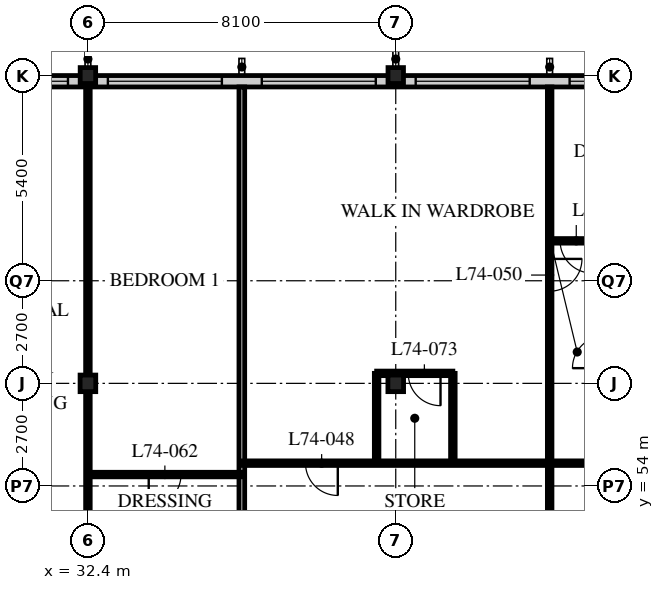
"""IFC4 building model, lengths in metres.
Left out: names, types, materials, properties, quantities, classifications, styles, units other than length and angle.
Written with IfcOpenShell. Run it as: python <this file> out.ifc"""

import sys

from ifc_helpers import new_model, si_unit, direction, frame, frame_2d, origin, origin_2d, place, context, subcontext, project, spatial, rectangle, i_section, extrude, element, fill, save


model = new_model("IFC4")
c1 = context("Model", 3, precision=1e-05, world=origin(), true_north=direction((0.0, 1.0)))
c2 = subcontext(c1, "Body", "Model", "MODEL_VIEW")
j1 = project(units=[si_unit("LENGTHUNIT", "METRE"), si_unit("PLANEANGLEUNIT", "RADIAN")], contexts=[c1])
p1 = place(None, origin())
s1 = spatial("IfcSite", under=j1, at=p1, CompositionType="ELEMENT")
p2 = place(p1, origin())
s2 = spatial("IfcBuilding", under=s1, at=p2, CompositionType="ELEMENT")
p3 = place(p2, frame((0.0, 0.0, 289.2)))
s3 = spatial("IfcBuildingStorey", under=s2, at=p3, CompositionType="ELEMENT", Elevation=289.2)
p4 = place(p3, frame((32.4, 56.7, 0.0), z_axis=(0.0, 0.0, 1.0), x_axis=(1.0, 0.0, 0.0)))
e1 = element("IfcColumn", 1, at=p4, inside=s3, PredefinedType="COLUMN", context=c2, shape_type="SweptSolid", body=[
    extrude(i_section(OverallWidth=0.412, OverallDepth=0.437, WebThickness=0.036, FlangeThickness=0.058, FilletRadius=0.015, at=origin_2d()), origin(), (0.0, 0.0, 1.0), 3.9),
])
p5 = place(p3, frame((32.4, 64.8, 0.0), z_axis=(0.0, 0.0, 1.0), x_axis=(1.0, 0.0, 0.0)))
e2 = element("IfcColumn", 2, at=p5, inside=s3, PredefinedType="COLUMN", context=c2, shape_type="SweptSolid", body=[
    extrude(i_section(OverallWidth=0.407, OverallDepth=0.419, WebThickness=0.031, FlangeThickness=0.049, FilletRadius=0.015, at=origin_2d()), origin(), (0.0, 0.0, 1.0), 3.9),
])
p6 = place(p3, frame((40.5, 56.7, 0.0), z_axis=(0.0, 0.0, 1.0), x_axis=(1.0, 0.0, 0.0)))
e3 = element("IfcColumn", 3, at=p6, inside=s3, PredefinedType="COLUMN", context=c2, shape_type="SweptSolid", body=[
    extrude(i_section(OverallWidth=0.412, OverallDepth=0.437, WebThickness=0.036, FlangeThickness=0.058, FilletRadius=0.015, at=origin_2d()), origin(), (0.0, 0.0, 1.0), 3.9),
])
p7 = place(p3, frame((40.5, 64.8, 0.0), z_axis=(0.0, 0.0, 1.0), x_axis=(1.0, 0.0, 0.0)))
e4 = element("IfcColumn", 4, at=p7, inside=s3, PredefinedType="COLUMN", context=c2, shape_type="SweptSolid", body=[
    extrude(i_section(OverallWidth=0.407, OverallDepth=0.419, WebThickness=0.031, FlangeThickness=0.049, FilletRadius=0.015, at=origin_2d()), origin(), (0.0, 0.0, 1.0), 3.9),
])
p8 = place(p3, frame((48.3, 64.65, 0.0), z_axis=(0.0, 0.0, 1.0), x_axis=(-1.0, 0.0, 0.0)))
e5 = element("IfcWall", 5, at=p8, inside=s3, PredefinedType="SOLIDWALL", context=c2, shape_type="SweptSolid", body=[
    extrude(rectangle(XDim=40.2, YDim=0.3, at=frame_2d((20.1, 0.0))), origin(), (0.0, 0.0, 1.0), 3.69),
])
p9 = place(p8, frame((0.225, 0.0, 0.6)))
e6 = element("IfcOpeningElement", 6, at=p9, cuts=e5, PredefinedType="OPENING", context=c2, shape_type="SweptSolid", body=[
    extrude(rectangle(XDim=3.0, YDim=2.4, at=frame_2d((1.5, 1.2))), frame((0.0, 0.16, 0.0), z_axis=(0.0, -1.0, 0.0), x_axis=(1.0, 0.0, 0.0)), (0.0, 0.0, 1.0), 0.32),
])
p10 = place(p8, frame((4.275, 0.0, 0.6)))
e7 = element("IfcOpeningElement", 7, at=p10, cuts=e5, PredefinedType="OPENING", context=c2, shape_type="SweptSolid", body=[
    extrude(rectangle(XDim=3.0, YDim=2.4, at=frame_2d((1.5, 1.2))), frame((0.0, 0.16, 0.0), z_axis=(0.0, -1.0, 0.0), x_axis=(1.0, 0.0, 0.0)), (0.0, 0.0, 1.0), 0.32),
])
p11 = place(p8, frame((8.325, 0.0, 0.6)))
e8 = element("IfcOpeningElement", 8, at=p11, cuts=e5, PredefinedType="OPENING", context=c2, shape_type="SweptSolid", body=[
    extrude(rectangle(XDim=3.0, YDim=2.4, at=frame_2d((1.5, 1.2))), frame((0.0, 0.16, 0.0), z_axis=(0.0, -1.0, 0.0), x_axis=(1.0, 0.0, 0.0)), (0.0, 0.0, 1.0), 0.32),
])
p12 = place(p8, frame((12.375, 0.0, 0.6)))
e9 = element("IfcOpeningElement", 9, at=p12, cuts=e5, PredefinedType="OPENING", context=c2, shape_type="SweptSolid", body=[
    extrude(rectangle(XDim=3.0, YDim=2.4, at=frame_2d((1.5, 1.2))), frame((0.0, 0.16, 0.0), z_axis=(0.0, -1.0, 0.0), x_axis=(1.0, 0.0, 0.0)), (0.0, 0.0, 1.0), 0.32),
])
p13 = place(p8, frame((16.425, 0.0, 0.6)))
e10 = element("IfcOpeningElement", 10, at=p13, cuts=e5, PredefinedType="OPENING", context=c2, shape_type="SweptSolid", body=[
    extrude(rectangle(XDim=3.0, YDim=2.4, at=frame_2d((1.5, 1.2))), frame((0.0, 0.16, 0.0), z_axis=(0.0, -1.0, 0.0), x_axis=(1.0, 0.0, 0.0)), (0.0, 0.0, 1.0), 0.32),
])
p14 = place(p8, frame((20.475, 0.0, 0.6)))
e11 = element("IfcOpeningElement", 11, at=p14, cuts=e5, PredefinedType="OPENING", context=c2, shape_type="SweptSolid", body=[
    extrude(rectangle(XDim=3.0, YDim=2.4, at=frame_2d((1.5, 1.2))), frame((0.0, 0.16, 0.0), z_axis=(0.0, -1.0, 0.0), x_axis=(1.0, 0.0, 0.0)), (0.0, 0.0, 1.0), 0.32),
])
p15 = place(p8, frame((24.525, 0.0, 0.6)))
e12 = element("IfcOpeningElement", 12, at=p15, cuts=e5, PredefinedType="OPENING", context=c2, shape_type="SweptSolid", body=[
    extrude(rectangle(XDim=3.0, YDim=2.4, at=frame_2d((1.5, 1.2))), frame((0.0, 0.16, 0.0), z_axis=(0.0, -1.0, 0.0), x_axis=(1.0, 0.0, 0.0)), (0.0, 0.0, 1.0), 0.32),
])
p16 = place(p8, frame((28.575, 0.0, 0.6)))
e13 = element("IfcOpeningElement", 13, at=p16, cuts=e5, PredefinedType="OPENING", context=c2, shape_type="SweptSolid", body=[
    extrude(rectangle(XDim=3.0, YDim=2.4, at=frame_2d((1.5, 1.2))), frame((0.0, 0.16, 0.0), z_axis=(0.0, -1.0, 0.0), x_axis=(1.0, 0.0, 0.0)), (0.0, 0.0, 1.0), 0.32),
])
p17 = place(p8, frame((32.625, 0.0, 0.6)))
e14 = element("IfcOpeningElement", 14, at=p17, cuts=e5, PredefinedType="OPENING", context=c2, shape_type="SweptSolid", body=[
    extrude(rectangle(XDim=3.0, YDim=2.4, at=frame_2d((1.5, 1.2))), frame((0.0, 0.16, 0.0), z_axis=(0.0, -1.0, 0.0), x_axis=(1.0, 0.0, 0.0)), (0.0, 0.0, 1.0), 0.32),
])
p18 = place(p8, frame((36.675, 0.0, 0.6)))
e15 = element("IfcOpeningElement", 15, at=p18, cuts=e5, PredefinedType="OPENING", context=c2, shape_type="SweptSolid", body=[
    extrude(rectangle(XDim=3.0, YDim=2.4, at=frame_2d((1.5, 1.2))), frame((0.0, 0.16, 0.0), z_axis=(0.0, -1.0, 0.0), x_axis=(1.0, 0.0, 0.0)), (0.0, 0.0, 1.0), 0.32),
])
p19 = place(p3, frame((32.4, 51.0, 0.0), z_axis=(0.0, 0.0, 1.0), x_axis=(0.0, 1.0, 0.0)))
e16 = element("IfcWall", 16, at=p19, inside=s3, PredefinedType="PARTITIONING", context=c2, shape_type="SweptSolid", body=[
    extrude(rectangle(XDim=13.5, YDim=0.12, at=frame_2d((6.75, 0.0))), origin(), (0.0, 0.0, 1.0), 3.078),
])
p20 = place(p3, frame((36.45, 64.5, 0.0), z_axis=(0.0, 0.0, 1.0), x_axis=(0.0, -1.0, 0.0)))
e17 = element("IfcWall", 17, at=p20, inside=s3, PredefinedType="PARTITIONING", context=c2, shape_type="SweptSolid", body=[
    extrude(rectangle(XDim=15.9, YDim=0.15, at=frame_2d((7.95, 0.0))), origin(), (0.0, 0.0, 1.0), 3.69),
])
p21 = place(p3, frame((36.45, 54.6, 0.0), z_axis=(0.0, 0.0, 1.0), x_axis=(1.0, 0.0, 0.0)))
e18 = element("IfcWall", 18, at=p21, inside=s3, PredefinedType="PARTITIONING", context=c2, shape_type="SweptSolid", body=[
    extrude(rectangle(XDim=19.95, YDim=0.12, at=frame_2d((9.975, 0.0))), origin(), (0.0, 0.0, 1.0), 3.69),
])
p22 = place(p21, frame((1.675, 0.0, 0.0)))
e19 = element("IfcOpeningElement", 19, at=p22, cuts=e18, PredefinedType="OPENING", context=c2, shape_type="SweptSolid", body=[
    extrude(rectangle(XDim=0.85, YDim=2.1, at=frame_2d((0.425, 1.05))), frame((0.0, 0.07, 0.0), z_axis=(0.0, -1.0, 0.0), x_axis=(1.0, 0.0, 0.0)), (0.0, 0.0, 1.0), 0.14),
])
p23 = place(p3, frame((44.55, 64.5, 0.0), z_axis=(0.0, 0.0, 1.0), x_axis=(0.0, -1.0, 0.0)))
e20 = element("IfcWall", 20, at=p23, inside=s3, PredefinedType="PARTITIONING", context=c2, shape_type="SweptSolid", body=[
    extrude(rectangle(XDim=17.7, YDim=0.12, at=frame_2d((8.85, 0.0))), origin(), (0.0, 0.0, 1.0), 3.69),
])
p24 = place(p23, frame((12.475, 0.0, 0.0)))
e21 = element("IfcOpeningElement", 21, at=p24, cuts=e20, PredefinedType="OPENING", context=c2, shape_type="SweptSolid", body=[
    extrude(rectangle(XDim=0.85, YDim=2.1, at=frame_2d((0.425, 1.05))), frame((0.0, 0.07, 0.0), z_axis=(0.0, -1.0, 0.0), x_axis=(1.0, 0.0, 0.0)), (0.0, 0.0, 1.0), 0.14),
])
p25 = place(p23, frame((4.525, 0.0, 0.0)))
e22 = element("IfcOpeningElement", 22, at=p25, cuts=e20, PredefinedType="OPENING", context=c2, shape_type="SweptSolid", body=[
    extrude(rectangle(XDim=0.85, YDim=2.1, at=frame_2d((0.425, 1.05))), frame((0.0, 0.07, 0.0), z_axis=(0.0, -1.0, 0.0), x_axis=(1.0, 0.0, 0.0)), (0.0, 0.0, 1.0), 0.14),
])
p26 = place(p3, frame((48.31, 60.45, 0.0), z_axis=(0.0, 0.0, 1.0), x_axis=(-1.0, 0.0, 0.0)))
e23 = element("IfcWall", 23, at=p26, inside=s3, PredefinedType="PARTITIONING", context=c2, shape_type="SweptSolid", body=[
    extrude(rectangle(XDim=3.76, YDim=0.12, at=frame_2d((1.88, 0.0))), origin(), (0.0, 0.0, 1.0), 3.69),
])
p27 = place(p26, frame((2.635, 0.0, 0.0)))
e24 = element("IfcOpeningElement", 24, at=p27, cuts=e23, PredefinedType="OPENING", context=c2, shape_type="SweptSolid", body=[
    extrude(rectangle(XDim=0.85, YDim=2.1, at=frame_2d((0.425, 1.05))), frame((0.0, 0.07, 0.0), z_axis=(0.0, -1.0, 0.0), x_axis=(1.0, 0.0, 0.0)), (0.0, 0.0, 1.0), 0.14),
])
p28 = place(p3, frame((32.4, 54.3, 0.0), z_axis=(0.0, 0.0, 1.0), x_axis=(1.0, 0.0, 0.0)))
e25 = element("IfcWall", 25, at=p28, inside=s3, PredefinedType="PARTITIONING", context=c2, shape_type="SweptSolid", body=[
    extrude(rectangle(XDim=4.05, YDim=0.12, at=frame_2d((2.025, 0.0))), origin(), (0.0, 0.0, 1.0), 3.69),
])
p29 = place(p28, frame((1.6, 0.0, 0.0)))
e26 = element("IfcOpeningElement", 26, at=p29, cuts=e25, PredefinedType="OPENING", context=c2, shape_type="SweptSolid", body=[
    extrude(rectangle(XDim=0.85, YDim=2.1, at=frame_2d((0.425, 1.05))), frame((0.0, 0.07, 0.0), z_axis=(0.0, -1.0, 0.0), x_axis=(1.0, 0.0, 0.0)), (0.0, 0.0, 1.0), 0.14),
])
for number, where, z_axis, x_axis in (
    (27, (39.997, 54.6, 0.0), (0.0, 0.0, 1.0), (0.0, 1.0, 0.0)),
    (28, (42.003, 54.6, 0.0), (0.0, 0.0, 1.0), (0.0, 1.0, 0.0)),
):
    element("IfcWall", number, at=place(p3, frame(where, z_axis=z_axis, x_axis=x_axis)), inside=s3, PredefinedType="PARTITIONING", context=c2, shape_type="SweptSolid", body=[
        extrude(rectangle(XDim=2.363, YDim=0.12, at=frame_2d((1.181, 0.0))), origin(), (0.0, 0.0, 1.0), 3.69),
    ])
p30 = place(p3, frame((39.997, 56.963, 0.0), z_axis=(0.0, 0.0, 1.0), x_axis=(1.0, 0.0, 0.0)))
e29 = element("IfcWall", 29, at=p30, inside=s3, PredefinedType="PARTITIONING", context=c2, shape_type="SweptSolid", body=[
    extrude(rectangle(XDim=2.006, YDim=0.12, at=frame_2d((1.003, 0.0))), origin(), (0.0, 0.0, 1.0), 3.69),
])
p31 = place(p30, frame((0.831, 0.0, 0.0)))
e30 = element("IfcOpeningElement", 30, at=p31, cuts=e29, PredefinedType="OPENING", context=c2, shape_type="SweptSolid", body=[
    extrude(rectangle(XDim=0.85, YDim=2.1, at=frame_2d((0.425, 1.05))), frame((0.0, 0.07, 0.0), z_axis=(0.0, -1.0, 0.0), x_axis=(1.0, 0.0, 0.0)), (0.0, 0.0, 1.0), 0.14),
])
p32 = place(p9, origin())
e31 = element("IfcWindow", 31, at=p32, inside=s3, PartitioningType="SINGLE_PANEL", PredefinedType="WINDOW", context=c2, shape_type="SweptSolid", body=[
    extrude(rectangle(XDim=3.0, YDim=2.4, at=frame_2d((1.5, 1.2))), frame((0.0, 0.03, 0.0), z_axis=(0.0, -1.0, 0.0), x_axis=(1.0, 0.0, 0.0)), (0.0, 0.0, 1.0), 0.06),
])
fill(e6, e31)
p33 = place(p10, origin())
e32 = element("IfcWindow", 32, at=p33, inside=s3, PartitioningType="SINGLE_PANEL", PredefinedType="WINDOW", context=c2, shape_type="SweptSolid", body=[
    extrude(rectangle(XDim=3.0, YDim=2.4, at=frame_2d((1.5, 1.2))), frame((0.0, 0.03, 0.0), z_axis=(0.0, -1.0, 0.0), x_axis=(1.0, 0.0, 0.0)), (0.0, 0.0, 1.0), 0.06),
])
fill(e7, e32)
p34 = place(p11, origin())
e33 = element("IfcWindow", 33, at=p34, inside=s3, PartitioningType="SINGLE_PANEL", PredefinedType="WINDOW", context=c2, shape_type="SweptSolid", body=[
    extrude(rectangle(XDim=3.0, YDim=2.4, at=frame_2d((1.5, 1.2))), frame((0.0, 0.03, 0.0), z_axis=(0.0, -1.0, 0.0), x_axis=(1.0, 0.0, 0.0)), (0.0, 0.0, 1.0), 0.06),
])
fill(e8, e33)
p35 = place(p12, origin())
e34 = element("IfcWindow", 34, at=p35, inside=s3, PartitioningType="SINGLE_PANEL", PredefinedType="WINDOW", context=c2, shape_type="SweptSolid", body=[
    extrude(rectangle(XDim=3.0, YDim=2.4, at=frame_2d((1.5, 1.2))), frame((0.0, 0.03, 0.0), z_axis=(0.0, -1.0, 0.0), x_axis=(1.0, 0.0, 0.0)), (0.0, 0.0, 1.0), 0.06),
])
fill(e9, e34)
p36 = place(p13, origin())
e35 = element("IfcWindow", 35, at=p36, inside=s3, PartitioningType="SINGLE_PANEL", PredefinedType="WINDOW", context=c2, shape_type="SweptSolid", body=[
    extrude(rectangle(XDim=3.0, YDim=2.4, at=frame_2d((1.5, 1.2))), frame((0.0, 0.03, 0.0), z_axis=(0.0, -1.0, 0.0), x_axis=(1.0, 0.0, 0.0)), (0.0, 0.0, 1.0), 0.06),
])
fill(e10, e35)
p37 = place(p22, origin())
e36 = element("IfcDoor", 36, at=p37, inside=s3, OperationType="SINGLE_SWING_LEFT", PredefinedType="DOOR", context=c2, shape_type="SweptSolid", body=[
    extrude(rectangle(XDim=0.85, YDim=2.1, at=frame_2d((0.425, 1.05))), frame((0.0, 0.025, 0.0), z_axis=(0.0, -1.0, 0.0), x_axis=(1.0, 0.0, 0.0)), (0.0, 0.0, 1.0), 0.05),
])
fill(e19, e36)
p38 = place(p25, origin())
e37 = element("IfcDoor", 37, at=p38, inside=s3, OperationType="SINGLE_SWING_LEFT", PredefinedType="DOOR", context=c2, shape_type="SweptSolid", body=[
    extrude(rectangle(XDim=0.85, YDim=2.1, at=frame_2d((0.425, 1.05))), frame((0.0, 0.025, 0.0), z_axis=(0.0, -1.0, 0.0), x_axis=(1.0, 0.0, 0.0)), (0.0, 0.0, 1.0), 0.05),
])
fill(e22, e37)
p39 = place(p27, origin())
e38 = element("IfcDoor", 38, at=p39, inside=s3, OperationType="SINGLE_SWING_LEFT", PredefinedType="DOOR", context=c2, shape_type="SweptSolid", body=[
    extrude(rectangle(XDim=0.85, YDim=2.1, at=frame_2d((0.425, 1.05))), frame((0.0, 0.025, 0.0), z_axis=(0.0, -1.0, 0.0), x_axis=(1.0, 0.0, 0.0)), (0.0, 0.0, 1.0), 0.05),
])
fill(e24, e38)
p40 = place(p29, origin())
e39 = element("IfcDoor", 39, at=p40, inside=s3, OperationType="SINGLE_SWING_RIGHT", PredefinedType="DOOR", context=c2, shape_type="SweptSolid", body=[
    extrude(rectangle(XDim=0.85, YDim=2.1, at=frame_2d((0.425, 1.05))), frame((0.0, 0.025, 0.0), z_axis=(0.0, -1.0, 0.0), x_axis=(1.0, 0.0, 0.0)), (0.0, 0.0, 1.0), 0.05),
])
fill(e26, e39)
p41 = place(p31, origin())
e40 = element("IfcDoor", 40, at=p41, inside=s3, OperationType="SINGLE_SWING_LEFT", PredefinedType="DOOR", context=c2, shape_type="SweptSolid", body=[
    extrude(rectangle(XDim=0.85, YDim=2.1, at=frame_2d((0.425, 1.05))), frame((0.0, 0.025, 0.0), z_axis=(0.0, -1.0, 0.0), x_axis=(1.0, 0.0, 0.0)), (0.0, 0.0, 1.0), 0.05),
])
fill(e30, e40)
save(model, sys.argv[1])
